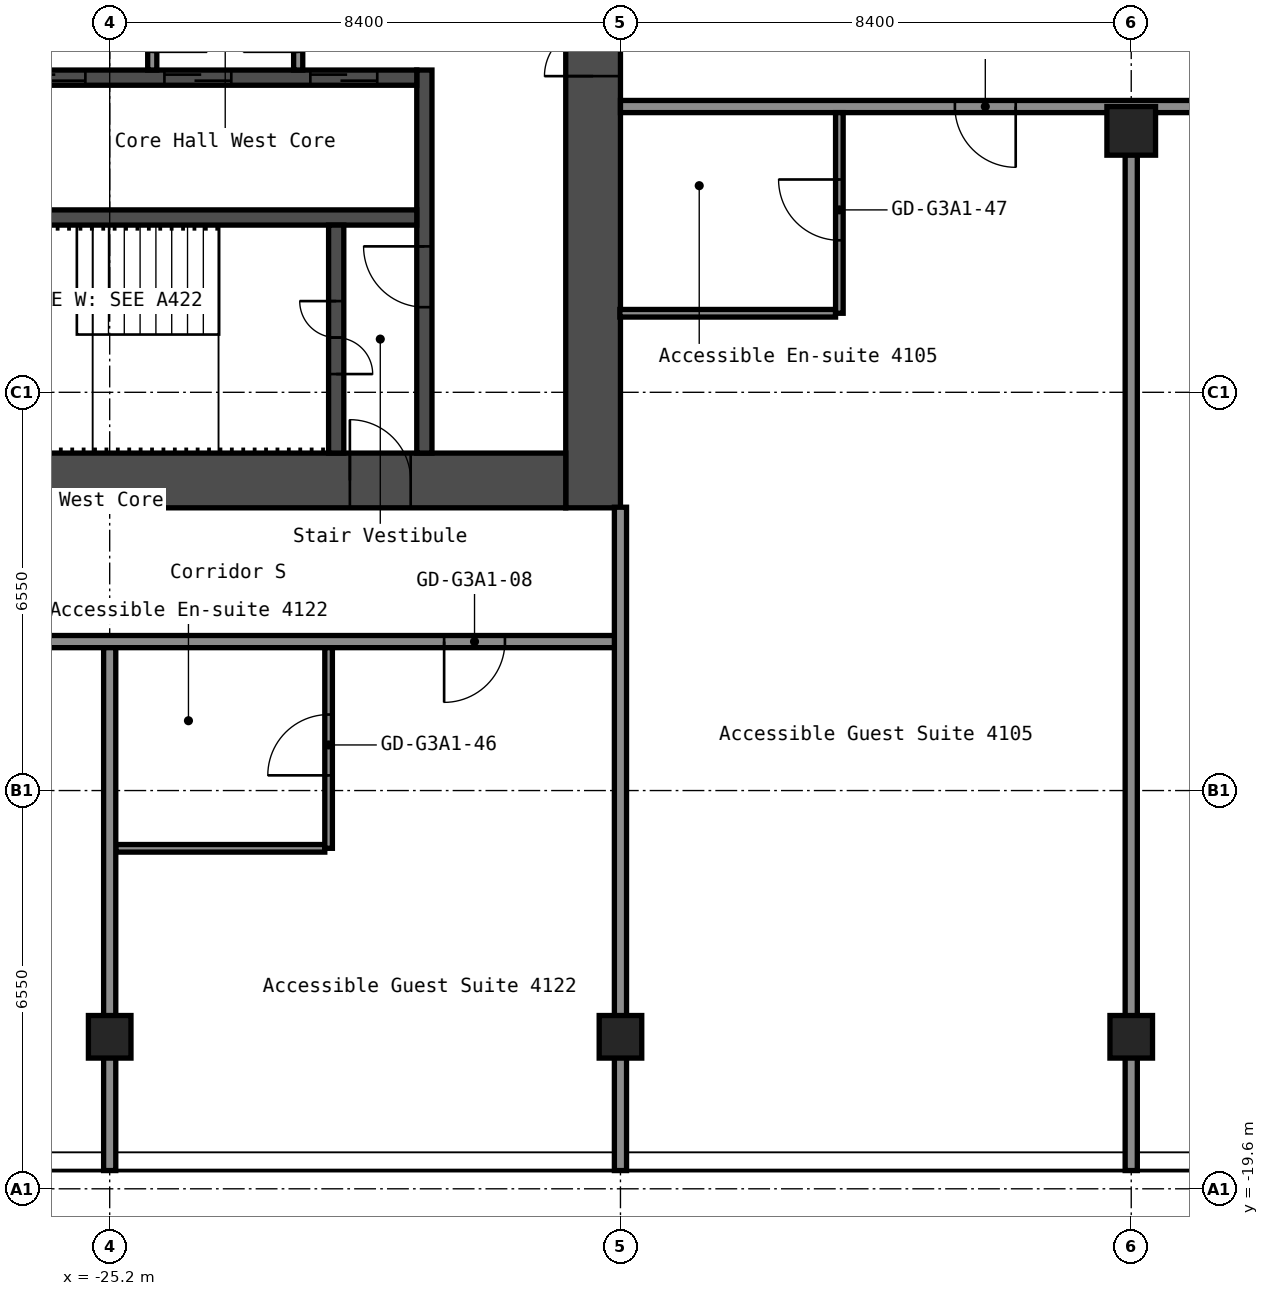
"""IFC4 building model, lengths in metres.
Left out: names, types, materials, properties, quantities, classifications, styles, units other than length and angle.
Written with IfcOpenShell. Run it as: python <this file> out.ifc"""

import sys

from ifc_helpers import new_model, si_unit, direction, frame, frame_2d, origin, origin_2d, place, context, subcontext, project, spatial, rectangle, hollow_rectangle, extrude, element, fill, save


model = new_model("IFC4")
c1 = context("Model", 3, precision=1e-05, world=origin(), true_north=direction((0.0, 1.0)))
c2 = subcontext(c1, "Body", "Model", "MODEL_VIEW")
j1 = project(units=[si_unit("LENGTHUNIT", "METRE"), si_unit("PLANEANGLEUNIT", "RADIAN")], contexts=[c1])
p1 = place(None, origin())
s1 = spatial("IfcSite", under=j1, at=p1, CompositionType="ELEMENT")
p2 = place(p1, origin())
s2 = spatial("IfcBuilding", under=s1, at=p2, CompositionType="ELEMENT")
p3 = place(p2, frame((0.0, 0.0, 147.0)))
s3 = spatial("IfcBuildingStorey", under=s2, at=p3, CompositionType="ELEMENT", Elevation=147.0)
for number, where, z_axis, x_axis in (
    (1, (-25.2, -17.1, 0.0), (0.0, 0.0, 1.0), (1.0, 0.0, 0.0)),
    (2, (-16.8, -17.1, 0.0), (0.0, 0.0, 1.0), (1.0, 0.0, 0.0)),
    (3, (-8.4, -17.1, 0.0), (0.0, 0.0, 1.0), (1.0, 0.0, 0.0)),
):
    element("IfcColumn", number, at=place(p3, frame(where, z_axis=z_axis, x_axis=x_axis)), inside=s3, PredefinedType="COLUMN", context=c2, shape_type="SweptSolid", body=[
        extrude(hollow_rectangle(XDim=0.7, YDim=0.7, WallThickness=0.028, at=origin_2d()), origin(), (0.0, 0.0, 1.0), 2.75),
    ])
p4 = place(p3, frame((-8.4, -2.2, 0.0), z_axis=(0.0, 0.0, 1.0), x_axis=(1.0, 0.0, 0.0)))
e4 = element("IfcColumn", 4, at=p4, inside=s3, PredefinedType="COLUMN", context=c2, shape_type="SweptSolid", body=[
    extrude(hollow_rectangle(XDim=0.8, YDim=0.8, WallThickness=0.032, at=origin_2d()), origin(), (0.0, 0.0, 1.0), 2.75),
])
p5 = place(p3, frame((-17.25, -8.4, 0.0), z_axis=(0.0, 0.0, 1.0), x_axis=(0.0, 1.0, 0.0)))
e5 = element("IfcWall", 5, at=p5, inside=s3, PredefinedType="SHEAR", context=c2, shape_type="SweptSolid", body=[
    extrude(rectangle(XDim=16.8, YDim=0.9, at=frame_2d((8.4, 0.0))), origin(), (0.0, 0.0, 1.0), 2.75),
])
p6 = place(p5, frame((7.1, 0.0, 0.0)))
e6 = element("IfcOpeningElement", 6, at=p6, cuts=e5, PredefinedType="OPENING", context=c2, shape_type="SweptSolid", body=[
    extrude(rectangle(XDim=1.6, YDim=2.1, at=frame_2d((0.8, 1.05))), frame((0.0, 0.46, 0.0), z_axis=(0.0, -1.0, 0.0), x_axis=(1.0, 0.0, 0.0)), (0.0, 0.0, 1.0), 0.92),
])
p7 = place(p3, frame((-32.7, -7.95, 0.0), z_axis=(0.0, 0.0, 1.0), x_axis=(1.0, 0.0, 0.0)))
e7 = element("IfcWall", 7, at=p7, inside=s3, PredefinedType="SHEAR", context=c2, shape_type="SweptSolid", body=[
    extrude(rectangle(XDim=15.0, YDim=0.9, at=frame_2d((7.5, 0.0))), origin(), (0.0, 0.0, 1.0), 2.75),
])
p8 = place(p7, frame((11.45, 0.0, 0.0)))
e8 = element("IfcOpeningElement", 8, at=p8, cuts=e7, PredefinedType="OPENING", context=c2, shape_type="SweptSolid", body=[
    extrude(rectangle(XDim=1.0, YDim=2.1, at=frame_2d((0.5, 1.05))), frame((0.0, 0.46, 0.0), z_axis=(0.0, -1.0, 0.0), x_axis=(1.0, 0.0, 0.0)), (0.0, 0.0, 1.0), 0.92),
])
p9 = place(p3, frame((-20.025, -7.5, 0.0), z_axis=(0.0, 0.0, 1.0), x_axis=(0.0, 1.0, 0.0)))
e9 = element("IfcWall", 9, at=p9, inside=s3, PredefinedType="SHEAR", context=c2, shape_type="SweptSolid", body=[
    extrude(rectangle(XDim=6.3, YDim=0.25, at=frame_2d((3.15, 0.0))), origin(), (0.0, 0.0, 1.0), 2.75),
])
p10 = place(p9, frame((2.4, 0.0, 0.0)))
e10 = element("IfcOpeningElement", 10, at=p10, cuts=e9, PredefinedType="OPENING", context=c2, shape_type="SweptSolid", body=[
    extrude(rectangle(XDim=1.0, YDim=2.1, at=frame_2d((0.5, 1.05))), frame((0.0, 0.135, 0.0), z_axis=(0.0, -1.0, 0.0), x_axis=(1.0, 0.0, 0.0)), (0.0, 0.0, 1.0), 0.27),
])
p11 = place(p3, frame((-27.65, -1.325, 0.0), z_axis=(0.0, 0.0, 1.0), x_axis=(1.0, 0.0, 0.0)))
e11 = element("IfcWall", 11, at=p11, inside=s3, PredefinedType="SHEAR", context=c2, shape_type="SweptSolid", body=[
    extrude(rectangle(XDim=7.5, YDim=0.25, at=frame_2d((3.75, 0.0))), origin(), (0.0, 0.0, 1.0), 2.75),
])
p12 = place(p11, frame((5.75, 0.0, 0.0)))
e12 = element("IfcOpeningElement", 12, at=p12, cuts=e11, PredefinedType="OPENING", context=c2, shape_type="SweptSolid", body=[
    extrude(rectangle(XDim=1.1, YDim=2.1, at=frame_2d((0.55, 1.05))), frame((0.0, 0.135, 0.0), z_axis=(0.0, -1.0, 0.0), x_axis=(1.0, 0.0, 0.0)), (0.0, 0.0, 1.0), 0.27),
])
p13 = place(p11, frame((3.35, 0.0, 0.0)))
e13 = element("IfcOpeningElement", 13, at=p13, cuts=e11, PredefinedType="OPENING", context=c2, shape_type="SweptSolid", body=[
    extrude(rectangle(XDim=1.1, YDim=2.1, at=frame_2d((0.55, 1.05))), frame((0.0, 0.135, 0.0), z_axis=(0.0, -1.0, 0.0), x_axis=(1.0, 0.0, 0.0)), (0.0, 0.0, 1.0), 0.27),
])
p14 = place(p11, frame((0.95, 0.0, 0.0)))
e14 = element("IfcOpeningElement", 14, at=p14, cuts=e11, PredefinedType="OPENING", context=c2, shape_type="SweptSolid", body=[
    extrude(rectangle(XDim=1.1, YDim=2.1, at=frame_2d((0.55, 1.05))), frame((0.0, 0.135, 0.0), z_axis=(0.0, -1.0, 0.0), x_axis=(1.0, 0.0, 0.0)), (0.0, 0.0, 1.0), 0.27),
])
p15 = place(p3, frame((-27.65, -3.625, 0.0), z_axis=(0.0, 0.0, 1.0), x_axis=(1.0, 0.0, 0.0)))
e15 = element("IfcWall", 15, at=p15, inside=s3, PredefinedType="SHEAR", context=c2, shape_type="SweptSolid", body=[
    extrude(rectangle(XDim=7.5, YDim=0.25, at=frame_2d((3.75, 0.0))), origin(), (0.0, 0.0, 1.0), 2.75),
])
p16 = place(p3, frame((-21.475, -7.5, 0.0), z_axis=(0.0, 0.0, 1.0), x_axis=(0.0, 1.0, 0.0)))
e16 = element("IfcWall", 16, at=p16, inside=s3, PredefinedType="SHEAR", context=c2, shape_type="SweptSolid", body=[
    extrude(rectangle(XDim=3.75, YDim=0.25, at=frame_2d((1.875, 0.0))), origin(), (0.0, 0.0, 1.0), 2.75),
])
p17 = place(p16, frame((1.3, 0.0, 0.0)))
e17 = element("IfcOpeningElement", 17, at=p17, cuts=e16, PredefinedType="OPENING", context=c2, shape_type="SweptSolid", body=[
    extrude(rectangle(XDim=1.2, YDim=2.1, at=frame_2d((0.6, 1.05))), frame((0.0, 0.135, 0.0), z_axis=(0.0, -1.0, 0.0), x_axis=(1.0, 0.0, 0.0)), (0.0, 0.0, 1.0), 0.27),
])
p18 = place(p3, frame((-22.1, -1.2, 0.0), z_axis=(0.0, 0.0, 1.0), x_axis=(0.0, 1.0, 0.0)))
e18 = element("IfcWall", 18, at=p18, inside=s3, PredefinedType="PARTITIONING", context=c2, shape_type="SweptSolid", body=[
    extrude(rectangle(XDim=2.4, YDim=0.15, at=frame_2d((1.2, 0.0))), origin(), (0.0, 0.0, 1.0), 2.75),
])
p19 = place(p18, frame((0.3, 0.0, 0.0)))
e19 = element("IfcOpeningElement", 19, at=p19, cuts=e18, PredefinedType="OPENING", context=c2, shape_type="SweptSolid", body=[
    extrude(rectangle(XDim=1.8, YDim=2.1, at=frame_2d((0.9, 1.05))), frame((0.0, 0.085, 0.0), z_axis=(0.0, -1.0, 0.0), x_axis=(1.0, 0.0, 0.0)), (0.0, 0.0, 1.0), 0.17),
])
p20 = place(p3, frame((-24.5, -1.2, 0.0), z_axis=(0.0, 0.0, 1.0), x_axis=(0.0, 1.0, 0.0)))
e20 = element("IfcWall", 20, at=p20, inside=s3, PredefinedType="PARTITIONING", context=c2, shape_type="SweptSolid", body=[
    extrude(rectangle(XDim=2.4, YDim=0.15, at=frame_2d((1.2, 0.0))), origin(), (0.0, 0.0, 1.0), 2.75),
])
p21 = place(p20, frame((0.3, 0.0, 0.0)))
e21 = element("IfcOpeningElement", 21, at=p21, cuts=e20, PredefinedType="OPENING", context=c2, shape_type="SweptSolid", body=[
    extrude(rectangle(XDim=1.8, YDim=2.1, at=frame_2d((0.9, 1.05))), frame((0.0, 0.085, 0.0), z_axis=(0.0, -1.0, 0.0), x_axis=(1.0, 0.0, 0.0)), (0.0, 0.0, 1.0), 0.17),
])
p22 = place(p3, frame((-25.1, -14.0, 0.0), z_axis=(0.0, 0.0, 1.0), x_axis=(1.0, 0.0, 0.0)))
e22 = element("IfcWall", 22, at=p22, inside=s3, PredefinedType="PARTITIONING", context=c2, shape_type="SweptSolid", body=[
    extrude(rectangle(XDim=3.438, YDim=0.125, at=frame_2d((1.719, 0.0))), origin(), (0.0, 0.0, 1.0), 2.75),
])
p23 = place(p3, frame((-42.7, -10.6, 0.0), z_axis=(0.0, 0.0, 1.0), x_axis=(1.0, 0.0, 0.0)))
e23 = element("IfcWall", 23, at=p23, inside=s3, PredefinedType="PARTITIONING", context=c2, shape_type="SweptSolid", body=[
    extrude(rectangle(XDim=25.9, YDim=0.2, at=frame_2d((12.95, 0.0))), origin(), (0.0, 0.0, 1.0), 2.75),
])
p24 = place(p23, frame((5.9, 0.0, 0.0)))
e24 = element("IfcOpeningElement", 24, at=p24, cuts=e23, PredefinedType="OPENING", context=c2, shape_type="SweptSolid", body=[
    extrude(rectangle(XDim=1.0, YDim=2.1, at=frame_2d((0.5, 1.05))), frame((0.0, 0.11, 0.0), z_axis=(0.0, -1.0, 0.0), x_axis=(1.0, 0.0, 0.0)), (0.0, 0.0, 1.0), 0.22),
])
p25 = place(p23, frame((14.5, 0.0, 0.0)))
e25 = element("IfcOpeningElement", 25, at=p25, cuts=e23, PredefinedType="OPENING", context=c2, shape_type="SweptSolid", body=[
    extrude(rectangle(XDim=1.0, YDim=2.1, at=frame_2d((0.5, 1.05))), frame((0.0, 0.11, 0.0), z_axis=(0.0, -1.0, 0.0), x_axis=(1.0, 0.0, 0.0)), (0.0, 0.0, 1.0), 0.22),
])
p26 = place(p23, frame((23.0, 0.0, 0.0)))
e26 = element("IfcOpeningElement", 26, at=p26, cuts=e23, PredefinedType="OPENING", context=c2, shape_type="SweptSolid", body=[
    extrude(rectangle(XDim=1.0, YDim=2.1, at=frame_2d((0.5, 1.05))), frame((0.0, 0.11, 0.0), z_axis=(0.0, -1.0, 0.0), x_axis=(1.0, 0.0, 0.0)), (0.0, 0.0, 1.0), 0.22),
])
p27 = place(p3, frame((-16.81, -5.2, 0.0), z_axis=(0.0, 0.0, 1.0), x_axis=(1.0, 0.0, 0.0)))
e27 = element("IfcWall", 27, at=p27, inside=s3, PredefinedType="PARTITIONING", context=c2, shape_type="SweptSolid", body=[
    extrude(rectangle(XDim=3.548, YDim=0.125, at=frame_2d((1.774, 0.0))), origin(), (0.0, 0.0, 1.0), 2.75),
])
p28 = place(p3, frame((-16.8, -1.8, 0.0), z_axis=(0.0, 0.0, 1.0), x_axis=(1.0, 0.0, 0.0)))
e28 = element("IfcWall", 28, at=p28, inside=s3, PredefinedType="PARTITIONING", context=c2, shape_type="SweptSolid", body=[
    extrude(rectangle(XDim=33.6, YDim=0.2, at=frame_2d((16.8, 0.0))), origin(), (0.0, 0.0, 1.0), 2.75),
])
p29 = place(p28, frame((5.5, 0.0, 0.0)))
e29 = element("IfcOpeningElement", 29, at=p29, cuts=e28, PredefinedType="OPENING", context=c2, shape_type="SweptSolid", body=[
    extrude(rectangle(XDim=1.0, YDim=2.1, at=frame_2d((0.5, 1.05))), frame((0.0, 0.11, 0.0), z_axis=(0.0, -1.0, 0.0), x_axis=(1.0, 0.0, 0.0)), (0.0, 0.0, 1.0), 0.22),
])
p30 = place(p28, frame((9.8, 0.0, 0.0)))
e30 = element("IfcOpeningElement", 30, at=p30, cuts=e28, PredefinedType="OPENING", context=c2, shape_type="SweptSolid", body=[
    extrude(rectangle(XDim=0.9, YDim=2.1, at=frame_2d((0.45, 1.05))), frame((0.0, 0.11, 0.0), z_axis=(0.0, -1.0, 0.0), x_axis=(1.0, 0.0, 0.0)), (0.0, 0.0, 1.0), 0.22),
])
p31 = place(p28, frame((14.0, 0.0, 0.0)))
e31 = element("IfcOpeningElement", 31, at=p31, cuts=e28, PredefinedType="OPENING", context=c2, shape_type="SweptSolid", body=[
    extrude(rectangle(XDim=0.9, YDim=2.1, at=frame_2d((0.45, 1.05))), frame((0.0, 0.11, 0.0), z_axis=(0.0, -1.0, 0.0), x_axis=(1.0, 0.0, 0.0)), (0.0, 0.0, 1.0), 0.22),
])
p32 = place(p28, frame((18.8, 0.0, 0.0)))
e32 = element("IfcOpeningElement", 32, at=p32, cuts=e28, PredefinedType="OPENING", context=c2, shape_type="SweptSolid", body=[
    extrude(rectangle(XDim=1.0, YDim=2.1, at=frame_2d((0.5, 1.05))), frame((0.0, 0.11, 0.0), z_axis=(0.0, -1.0, 0.0), x_axis=(1.0, 0.0, 0.0)), (0.0, 0.0, 1.0), 0.22),
])
p33 = place(p28, frame((27.2, 0.0, 0.0)))
e33 = element("IfcOpeningElement", 33, at=p33, cuts=e28, PredefinedType="OPENING", context=c2, shape_type="SweptSolid", body=[
    extrude(rectangle(XDim=1.0, YDim=2.1, at=frame_2d((0.5, 1.05))), frame((0.0, 0.11, 0.0), z_axis=(0.0, -1.0, 0.0), x_axis=(1.0, 0.0, 0.0)), (0.0, 0.0, 1.0), 0.22),
])
p34 = place(p3, frame((-25.2, -19.3, 0.0), z_axis=(0.0, 0.0, 1.0), x_axis=(0.0, 1.0, 0.0)))
e34 = element("IfcWall", 34, at=p34, inside=s3, PredefinedType="PARTITIONING", context=c2, shape_type="SweptSolid", body=[
    extrude(rectangle(XDim=8.6, YDim=0.2, at=frame_2d((4.3, 0.0))), origin(), (0.0, 0.0, 1.0), 2.75),
])
p35 = place(p3, frame((-21.6, -14.0, 0.0), z_axis=(0.0, 0.0, 1.0), x_axis=(0.0, 1.0, 0.0)))
e35 = element("IfcWall", 35, at=p35, inside=s3, PredefinedType="PARTITIONING", context=c2, shape_type="SweptSolid", body=[
    extrude(rectangle(XDim=3.3, YDim=0.125, at=frame_2d((1.65, 0.0))), origin(), (0.0, 0.0, 1.0), 2.75),
])
p36 = place(p35, frame((1.2, 0.0, 0.0)))
e36 = element("IfcOpeningElement", 36, at=p36, cuts=e35, PredefinedType="OPENING", context=c2, shape_type="SweptSolid", body=[
    extrude(rectangle(XDim=1.0, YDim=2.1, at=frame_2d((0.5, 1.05))), frame((0.0, 0.073, 0.0), z_axis=(0.0, -1.0, 0.0), x_axis=(1.0, 0.0, 0.0)), (0.0, 0.0, 1.0), 0.145),
])
p37 = place(p3, frame((-16.8, -19.3, 0.0), z_axis=(0.0, 0.0, 1.0), x_axis=(0.0, 1.0, 0.0)))
e37 = element("IfcWall", 37, at=p37, inside=s3, PredefinedType="PARTITIONING", context=c2, shape_type="SweptSolid", body=[
    extrude(rectangle(XDim=10.91, YDim=0.2, at=frame_2d((5.455, 0.0))), origin(), (0.0, 0.0, 1.0), 2.75),
])
p38 = place(p3, frame((-13.2, -5.2, 0.0), z_axis=(0.0, 0.0, 1.0), x_axis=(0.0, 1.0, 0.0)))
e38 = element("IfcWall", 38, at=p38, inside=s3, PredefinedType="PARTITIONING", context=c2, shape_type="SweptSolid", body=[
    extrude(rectangle(XDim=3.3, YDim=0.125, at=frame_2d((1.65, 0.0))), origin(), (0.0, 0.0, 1.0), 2.75),
])
p39 = place(p38, frame((1.2, 0.0, 0.0)))
e39 = element("IfcOpeningElement", 39, at=p39, cuts=e38, PredefinedType="OPENING", context=c2, shape_type="SweptSolid", body=[
    extrude(rectangle(XDim=1.0, YDim=2.1, at=frame_2d((0.5, 1.05))), frame((0.0, 0.073, 0.0), z_axis=(0.0, -1.0, 0.0), x_axis=(1.0, 0.0, 0.0)), (0.0, 0.0, 1.0), 0.145),
])
p40 = place(p3, frame((-8.4, -19.3, 0.0), z_axis=(0.0, 0.0, 1.0), x_axis=(0.0, 1.0, 0.0)))
e40 = element("IfcWall", 40, at=p40, inside=s3, PredefinedType="PARTITIONING", context=c2, shape_type="SweptSolid", body=[
    extrude(rectangle(XDim=16.71, YDim=0.2, at=frame_2d((8.355, 0.0))), origin(), (0.0, 0.0, 1.0), 2.75),
])
p41 = place(p6, origin())
e41 = element("IfcDoor", 41, at=p41, inside=s3, OperationType="DOUBLE_DOOR_SINGLE_SWING", PredefinedType="DOOR", context=c2, shape_type="SweptSolid", body=[
    extrude(rectangle(XDim=1.6, YDim=2.1, at=frame_2d((0.8, 1.05))), frame((0.0, 0.025, 0.0), z_axis=(0.0, -1.0, 0.0), x_axis=(1.0, 0.0, 0.0)), (0.0, 0.0, 1.0), 0.05),
])
fill(e6, e41)
p42 = place(p8, origin())
e42 = element("IfcDoor", 42, at=p42, inside=s3, OperationType="SINGLE_SWING_RIGHT", PredefinedType="DOOR", context=c2, shape_type="SweptSolid", body=[
    extrude(rectangle(XDim=1.0, YDim=2.1, at=frame_2d((0.5, 1.05))), frame((0.0, 0.025, 0.0), z_axis=(0.0, -1.0, 0.0), x_axis=(1.0, 0.0, 0.0)), (0.0, 0.0, 1.0), 0.05),
])
fill(e8, e42)
p43 = place(p17, origin())
e43 = element("IfcDoor", 43, at=p43, inside=s3, OperationType="DOUBLE_DOOR_SINGLE_SWING", PredefinedType="DOOR", context=c2, shape_type="SweptSolid", body=[
    extrude(rectangle(XDim=1.2, YDim=2.1, at=frame_2d((0.6, 1.05))), frame((0.0, 0.025, 0.0), z_axis=(0.0, -1.0, 0.0), x_axis=(1.0, 0.0, 0.0)), (0.0, 0.0, 1.0), 0.05),
])
fill(e17, e43)
p44 = place(p10, origin())
e44 = element("IfcDoor", 44, at=p44, inside=s3, OperationType="SINGLE_SWING_LEFT", PredefinedType="DOOR", context=c2, shape_type="SweptSolid", body=[
    extrude(rectangle(XDim=1.0, YDim=2.1, at=frame_2d((0.5, 1.05))), frame((0.0, 0.025, 0.0), z_axis=(0.0, -1.0, 0.0), x_axis=(1.0, 0.0, 0.0)), (0.0, 0.0, 1.0), 0.05),
])
fill(e10, e44)
p45 = place(p19, origin())
e45 = element("IfcDoor", 45, at=p45, inside=s3, OperationType="DOUBLE_DOOR_SINGLE_SWING", PredefinedType="DOOR", context=c2, shape_type="SweptSolid", body=[
    extrude(rectangle(XDim=1.8, YDim=2.1, at=frame_2d((0.9, 1.05))), frame((0.0, 0.025, 0.0), z_axis=(0.0, -1.0, 0.0), x_axis=(1.0, 0.0, 0.0)), (0.0, 0.0, 1.0), 0.05),
])
fill(e19, e45)
p46 = place(p21, origin())
e46 = element("IfcDoor", 46, at=p46, inside=s3, OperationType="DOUBLE_DOOR_SINGLE_SWING", PredefinedType="DOOR", context=c2, shape_type="SweptSolid", body=[
    extrude(rectangle(XDim=1.8, YDim=2.1, at=frame_2d((0.9, 1.05))), frame((0.0, 0.025, 0.0), z_axis=(0.0, -1.0, 0.0), x_axis=(1.0, 0.0, 0.0)), (0.0, 0.0, 1.0), 0.05),
])
fill(e21, e46)
p47 = place(p12, origin())
e47 = element("IfcDoor", 47, at=p47, inside=s3, OperationType="DOUBLE_DOOR_SLIDING", PredefinedType="DOOR", context=c2, shape_type="SweptSolid", body=[
    extrude(rectangle(XDim=1.1, YDim=2.1, at=frame_2d((0.55, 1.05))), frame((0.0, 0.025, 0.0), z_axis=(0.0, -1.0, 0.0), x_axis=(1.0, 0.0, 0.0)), (0.0, 0.0, 1.0), 0.05),
])
fill(e12, e47)
p48 = place(p13, origin())
e48 = element("IfcDoor", 48, at=p48, inside=s3, OperationType="DOUBLE_DOOR_SLIDING", PredefinedType="DOOR", context=c2, shape_type="SweptSolid", body=[
    extrude(rectangle(XDim=1.1, YDim=2.1, at=frame_2d((0.55, 1.05))), frame((0.0, 0.025, 0.0), z_axis=(0.0, -1.0, 0.0), x_axis=(1.0, 0.0, 0.0)), (0.0, 0.0, 1.0), 0.05),
])
fill(e13, e48)
p49 = place(p14, origin())
e49 = element("IfcDoor", 49, at=p49, inside=s3, OperationType="DOUBLE_DOOR_SLIDING", PredefinedType="DOOR", context=c2, shape_type="SweptSolid", body=[
    extrude(rectangle(XDim=1.1, YDim=2.1, at=frame_2d((0.55, 1.05))), frame((0.0, 0.025, 0.0), z_axis=(0.0, -1.0, 0.0), x_axis=(1.0, 0.0, 0.0)), (0.0, 0.0, 1.0), 0.05),
])
fill(e14, e49)
p50 = place(p26, origin())
e50 = element("IfcDoor", 50, at=p50, inside=s3, OperationType="SINGLE_SWING_LEFT", PredefinedType="DOOR", context=c2, shape_type="SweptSolid", body=[
    extrude(rectangle(XDim=1.0, YDim=2.1, at=frame_2d((0.5, 1.05))), frame((0.0, 0.025, 0.0), z_axis=(0.0, -1.0, 0.0), x_axis=(1.0, 0.0, 0.0)), (0.0, 0.0, 1.0), 0.05),
])
fill(e26, e50)
p51 = place(p29, origin())
e51 = element("IfcDoor", 51, at=p51, inside=s3, OperationType="SINGLE_SWING_RIGHT", PredefinedType="DOOR", context=c2, shape_type="SweptSolid", body=[
    extrude(rectangle(XDim=1.0, YDim=2.1, at=frame_2d((0.5, 1.05))), frame((0.0, 0.025, 0.0), z_axis=(0.0, -1.0, 0.0), x_axis=(1.0, 0.0, 0.0)), (0.0, 0.0, 1.0), 0.05),
])
fill(e29, e51)
p52 = place(p36, origin())
e52 = element("IfcDoor", 52, at=p52, inside=s3, OperationType="SINGLE_SWING_RIGHT", PredefinedType="DOOR", context=c2, shape_type="SweptSolid", body=[
    extrude(rectangle(XDim=1.0, YDim=2.1, at=frame_2d((0.5, 1.05))), frame((0.0, 0.025, 0.0), z_axis=(0.0, -1.0, 0.0), x_axis=(1.0, 0.0, 0.0)), (0.0, 0.0, 1.0), 0.05),
])
fill(e36, e52)
p53 = place(p39, origin())
e53 = element("IfcDoor", 53, at=p53, inside=s3, OperationType="SINGLE_SWING_LEFT", PredefinedType="DOOR", context=c2, shape_type="SweptSolid", body=[
    extrude(rectangle(XDim=1.0, YDim=2.1, at=frame_2d((0.5, 1.05))), frame((0.0, 0.025, 0.0), z_axis=(0.0, -1.0, 0.0), x_axis=(1.0, 0.0, 0.0)), (0.0, 0.0, 1.0), 0.05),
])
fill(e39, e53)
save(model, sys.argv[1])
